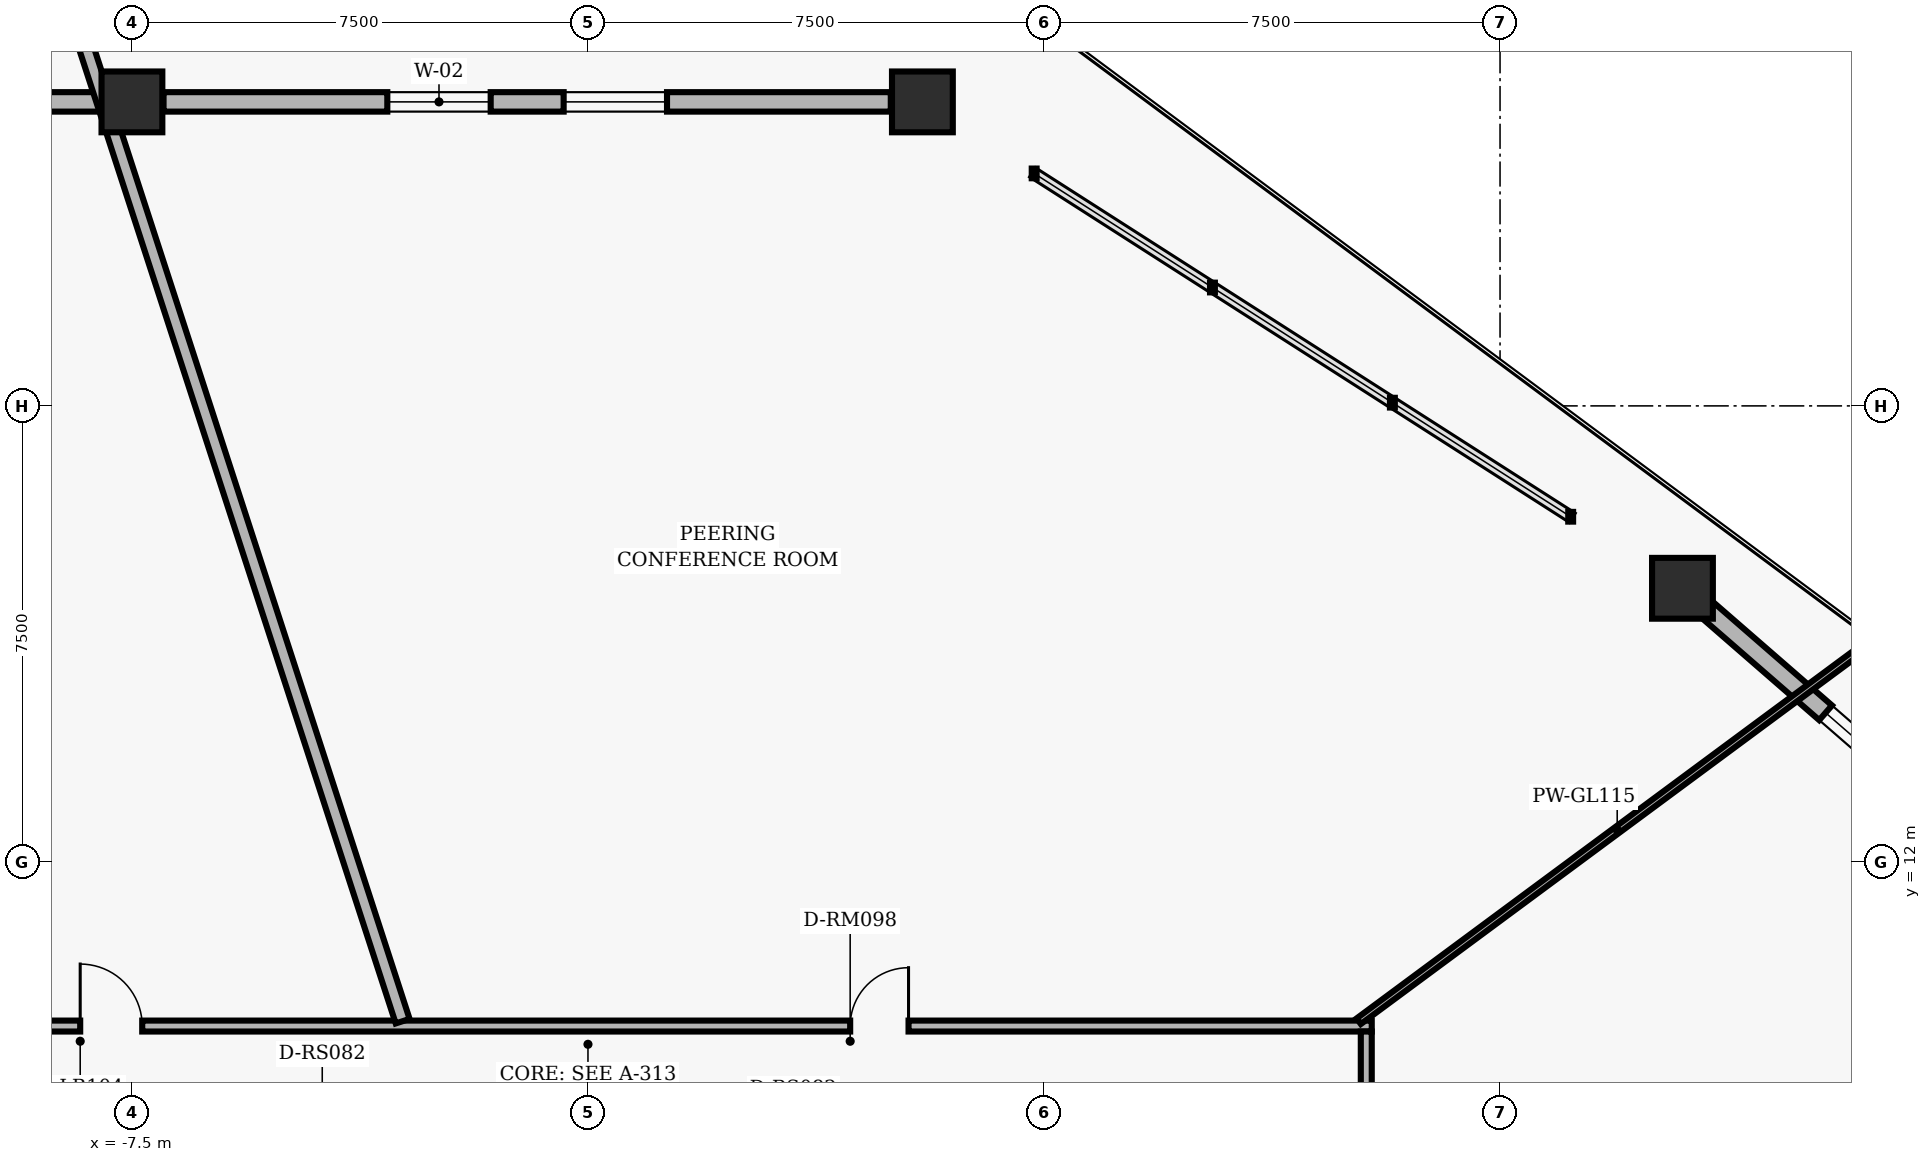
"""IFC4 building model, lengths in metres.
Left out: names, types, materials, properties, quantities, classifications, styles, units other than length and angle.
Written with IfcOpenShell. Run it as: python <this file> out.ifc"""

import sys

from ifc_helpers import new_model, si_unit, direction, frame, frame_2d, origin, origin_2d, place, context, subcontext, project, spatial, rectangle, extrude, element, fill, save


model = new_model("IFC4")
c1 = context("Model", 3, precision=1e-05, world=origin(), true_north=direction((0.0, 1.0)))
c2 = subcontext(c1, "Body", "Model", "MODEL_VIEW")
j1 = project(units=[si_unit("LENGTHUNIT", "METRE"), si_unit("PLANEANGLEUNIT", "RADIAN")], contexts=[c1])
p1 = place(None, origin())
s1 = spatial("IfcSite", under=j1, at=p1, CompositionType="ELEMENT")
p2 = place(p1, origin())
s2 = spatial("IfcBuilding", under=s1, at=p2, CompositionType="ELEMENT")
p3 = place(p2, frame((0.0, 0.0, 8.32)))
s3 = spatial("IfcBuildingStorey", under=s2, at=p3, CompositionType="ELEMENT", Elevation=8.32)
for number, where, z_axis, x_axis in (
    (1, (18.0, 16.5, 0.0), (0.0, 0.0, 1.0), (1.0, 0.0, 0.0)),
    (2, (5.5, 24.5, 0.0), (0.0, 0.0, 1.0), (1.0, 0.0, 0.0)),
    (3, (-7.5, 24.5, 0.0), (0.0, 0.0, 1.0), (1.0, 0.0, 0.0)),
):
    element("IfcColumn", number, at=place(p3, frame(where, z_axis=z_axis, x_axis=x_axis)), inside=s3, PredefinedType="COLUMN", context=c2, shape_type="SweptSolid", body=[
        extrude(rectangle(XDim=1.0, YDim=1.0, at=origin_2d()), origin(), (0.0, 0.0, 1.0), 3.52),
    ])
p4 = place(p3, frame((18.392, 16.159, 0.0), z_axis=(0.0, 0.0, 1.0), x_axis=(0.754615886195, -0.656166796098, 0.0)))
e4 = element("IfcWall", 4, at=p4, inside=s3, PredefinedType="SOLIDWALL", context=c2, shape_type="SweptSolid", body=[
    extrude(rectangle(XDim=14.2, YDim=0.32, at=frame_2d((7.1, 0.0))), origin(), (0.0, 0.0, 1.0), 2.261),
])
p5 = place(p4, frame((2.6, 0.0, 0.65)))
e5 = element("IfcOpeningElement", 5, at=p5, cuts=e4, PredefinedType="OPENING", context=c2, shape_type="SweptSolid", body=[
    extrude(rectangle(XDim=2.2, YDim=1.1, at=frame_2d((1.1, 0.55))), frame((0.0, 0.17, 0.0), z_axis=(0.0, -1.0, 0.0), x_axis=(1.0, 0.0, 0.0)), (0.0, 0.0, 1.0), 0.34),
])
p6 = place(p4, frame((9.4, 0.0, 0.65)))
e6 = element("IfcOpeningElement", 6, at=p6, cuts=e4, PredefinedType="OPENING", context=c2, shape_type="SweptSolid", body=[
    extrude(rectangle(XDim=2.2, YDim=1.1, at=frame_2d((1.1, 0.55))), frame((0.0, 0.17, 0.0), z_axis=(0.0, -1.0, 0.0), x_axis=(1.0, 0.0, 0.0)), (0.0, 0.0, 1.0), 0.34),
])
p7 = place(p3, frame((-6.98, 24.5, 0.0), z_axis=(0.0, 0.0, 1.0), x_axis=(1.0, 0.0, 0.0)))
e7 = element("IfcWall", 7, at=p7, inside=s3, PredefinedType="SOLIDWALL", context=c2, shape_type="SweptSolid", body=[
    extrude(rectangle(XDim=11.96, YDim=0.32, at=frame_2d((5.98, 0.0))), origin(), (0.0, 0.0, 1.0), 2.588),
])
p8 = place(p7, frame((3.68, 0.0, 0.65)))
e8 = element("IfcOpeningElement", 8, at=p8, cuts=e7, PredefinedType="OPENING", context=c2, shape_type="SweptSolid", body=[
    extrude(rectangle(XDim=1.7, YDim=1.5, at=frame_2d((0.85, 0.75))), frame((0.0, 0.17, 0.0), z_axis=(0.0, -1.0, 0.0), x_axis=(1.0, 0.0, 0.0)), (0.0, 0.0, 1.0), 0.34),
])
p9 = place(p7, frame((6.58, 0.0, 0.65)))
e9 = element("IfcOpeningElement", 9, at=p9, cuts=e7, PredefinedType="OPENING", context=c2, shape_type="SweptSolid", body=[
    extrude(rectangle(XDim=1.7, YDim=1.5, at=frame_2d((0.85, 0.75))), frame((0.0, 0.17, 0.0), z_axis=(0.0, -1.0, 0.0), x_axis=(1.0, 0.0, 0.0)), (0.0, 0.0, 1.0), 0.34),
])
p10 = place(p3, frame((-20.98, 24.5, 0.0), z_axis=(0.0, 0.0, 1.0), x_axis=(1.0, 0.0, 0.0)))
e10 = element("IfcWall", 10, at=p10, inside=s3, PredefinedType="SOLIDWALL", context=c2, shape_type="SweptSolid", body=[
    extrude(rectangle(XDim=12.96, YDim=0.32, at=frame_2d((6.48, 0.0))), origin(), (0.0, 0.0, 1.0), 2.588),
])
p11 = place(p10, frame((8.28, 0.0, 0.65)))
e11 = element("IfcOpeningElement", 11, at=p11, cuts=e10, PredefinedType="OPENING", context=c2, shape_type="SweptSolid", body=[
    extrude(rectangle(XDim=1.2, YDim=1.6, at=frame_2d((0.6, 0.8))), frame((0.0, 0.17, 0.0), z_axis=(0.0, -1.0, 0.0), x_axis=(1.0, 0.0, 0.0)), (0.0, 0.0, 1.0), 0.34),
])
p12 = place(p3, frame((-12.89, 9.3, 0.0), z_axis=(0.0, 0.0, 1.0), x_axis=(1.0, 0.0, 0.0)))
e12 = element("IfcWall", 12, at=p12, inside=s3, PredefinedType="PARTITIONING", context=c2, shape_type="SweptSolid", body=[
    extrude(rectangle(XDim=25.78, YDim=0.18, at=frame_2d((12.89, 0.0))), origin(), (0.0, 0.0, 1.0), 2.76),
])
p13 = place(p12, frame((17.202, 0.0, 0.0)))
e13 = element("IfcOpeningElement", 13, at=p13, cuts=e12, PredefinedType="OPENING", context=c2, shape_type="SweptSolid", body=[
    extrude(rectangle(XDim=0.96, YDim=2.02, at=frame_2d((0.48, 1.01))), frame((0.0, 0.1, 0.0), z_axis=(0.0, -1.0, 0.0), x_axis=(1.0, 0.0, 0.0)), (0.0, 0.0, 1.0), 0.2),
])
p14 = place(p12, frame((4.539, 0.0, 0.0)))
e14 = element("IfcOpeningElement", 14, at=p14, cuts=e12, PredefinedType="OPENING", context=c2, shape_type="SweptSolid", body=[
    extrude(rectangle(XDim=1.02, YDim=2.02, at=frame_2d((0.51, 1.01))), frame((0.0, 0.1, 0.0), z_axis=(0.0, -1.0, 0.0), x_axis=(1.0, 0.0, 0.0)), (0.0, 0.0, 1.0), 0.2),
])
p15 = place(p3, frame((12.8, 9.21, 0.0), z_axis=(0.0, 0.0, 1.0), x_axis=(0.0, -1.0, 0.0)))
e15 = element("IfcWall", 15, at=p15, inside=s3, PredefinedType="PARTITIONING", context=c2, shape_type="SweptSolid", body=[
    extrude(rectangle(XDim=7.62, YDim=0.18, at=frame_2d((3.81, 0.0))), origin(), (0.0, 0.0, 1.0), 3.193),
])
p16 = place(p3, frame((12.676, 9.38, 0.0), z_axis=(0.0, 0.0, 1.0), x_axis=(0.803850730109, 0.594831071568, 0.0)))
e16 = element("IfcWall", 16, at=p16, inside=s3, PredefinedType="MOVABLE", context=c2, shape_type="SweptSolid", body=[
    extrude(rectangle(XDim=10.575, YDim=0.115, at=frame_2d((5.288, 0.0))), origin(), (0.0, 0.0, 1.0), 2.246),
])
p17 = place(p3, frame((-3.048, 9.38, 0.0), z_axis=(0.0, 0.0, 1.0), x_axis=(-0.309026872476, 0.951053306649, 0.0)))
e17 = element("IfcWall", 17, at=p17, inside=s3, PredefinedType="PARTITIONING", context=c2, shape_type="SweptSolid", body=[
    extrude(rectangle(XDim=18.464, YDim=0.24, at=frame_2d((9.232, 0.0))), origin(), (0.0, 0.0, 1.0), 2.246),
])
p18 = place(p5, origin())
e18 = element("IfcWindow", 18, at=p18, inside=s3, PartitioningType="SINGLE_PANEL", PredefinedType="WINDOW", context=c2, shape_type="SweptSolid", body=[
    extrude(rectangle(XDim=2.2, YDim=1.1, at=frame_2d((1.1, 0.55))), frame((0.0, 0.03, 0.0), z_axis=(0.0, -1.0, 0.0), x_axis=(1.0, 0.0, 0.0)), (0.0, 0.0, 1.0), 0.06),
])
fill(e5, e18)
p19 = place(p8, origin())
e19 = element("IfcWindow", 19, at=p19, inside=s3, PartitioningType="SINGLE_PANEL", PredefinedType="WINDOW", context=c2, shape_type="SweptSolid", body=[
    extrude(rectangle(XDim=1.7, YDim=1.5, at=frame_2d((0.85, 0.75))), frame((0.0, 0.03, 0.0), z_axis=(0.0, -1.0, 0.0), x_axis=(1.0, 0.0, 0.0)), (0.0, 0.0, 1.0), 0.06),
])
fill(e8, e19)
p20 = place(p9, origin())
e20 = element("IfcWindow", 20, at=p20, inside=s3, PartitioningType="SINGLE_PANEL", PredefinedType="WINDOW", context=c2, shape_type="SweptSolid", body=[
    extrude(rectangle(XDim=1.7, YDim=1.5, at=frame_2d((0.85, 0.75))), frame((0.0, 0.03, 0.0), z_axis=(0.0, -1.0, 0.0), x_axis=(1.0, 0.0, 0.0)), (0.0, 0.0, 1.0), 0.06),
])
fill(e9, e20)
p21 = place(p13, origin())
e21 = element("IfcDoor", 21, at=p21, inside=s3, OperationType="SINGLE_SWING_RIGHT", PredefinedType="DOOR", context=c2, shape_type="SweptSolid", body=[
    extrude(rectangle(XDim=0.96, YDim=2.02, at=frame_2d((0.48, 1.01))), frame((0.0, 0.025, 0.0), z_axis=(0.0, -1.0, 0.0), x_axis=(1.0, 0.0, 0.0)), (0.0, 0.0, 1.0), 0.05),
])
fill(e13, e21)
p22 = place(p14, origin())
e22 = element("IfcDoor", 22, at=p22, inside=s3, OperationType="SINGLE_SWING_LEFT", PredefinedType="DOOR", context=c2, shape_type="SweptSolid", body=[
    extrude(rectangle(XDim=1.02, YDim=2.02, at=frame_2d((0.51, 1.01))), frame((0.0, 0.025, 0.0), z_axis=(0.0, -1.0, 0.0), x_axis=(1.0, 0.0, 0.0)), (0.0, 0.0, 1.0), 0.05),
])
fill(e14, e22)
save(model, sys.argv[1])
